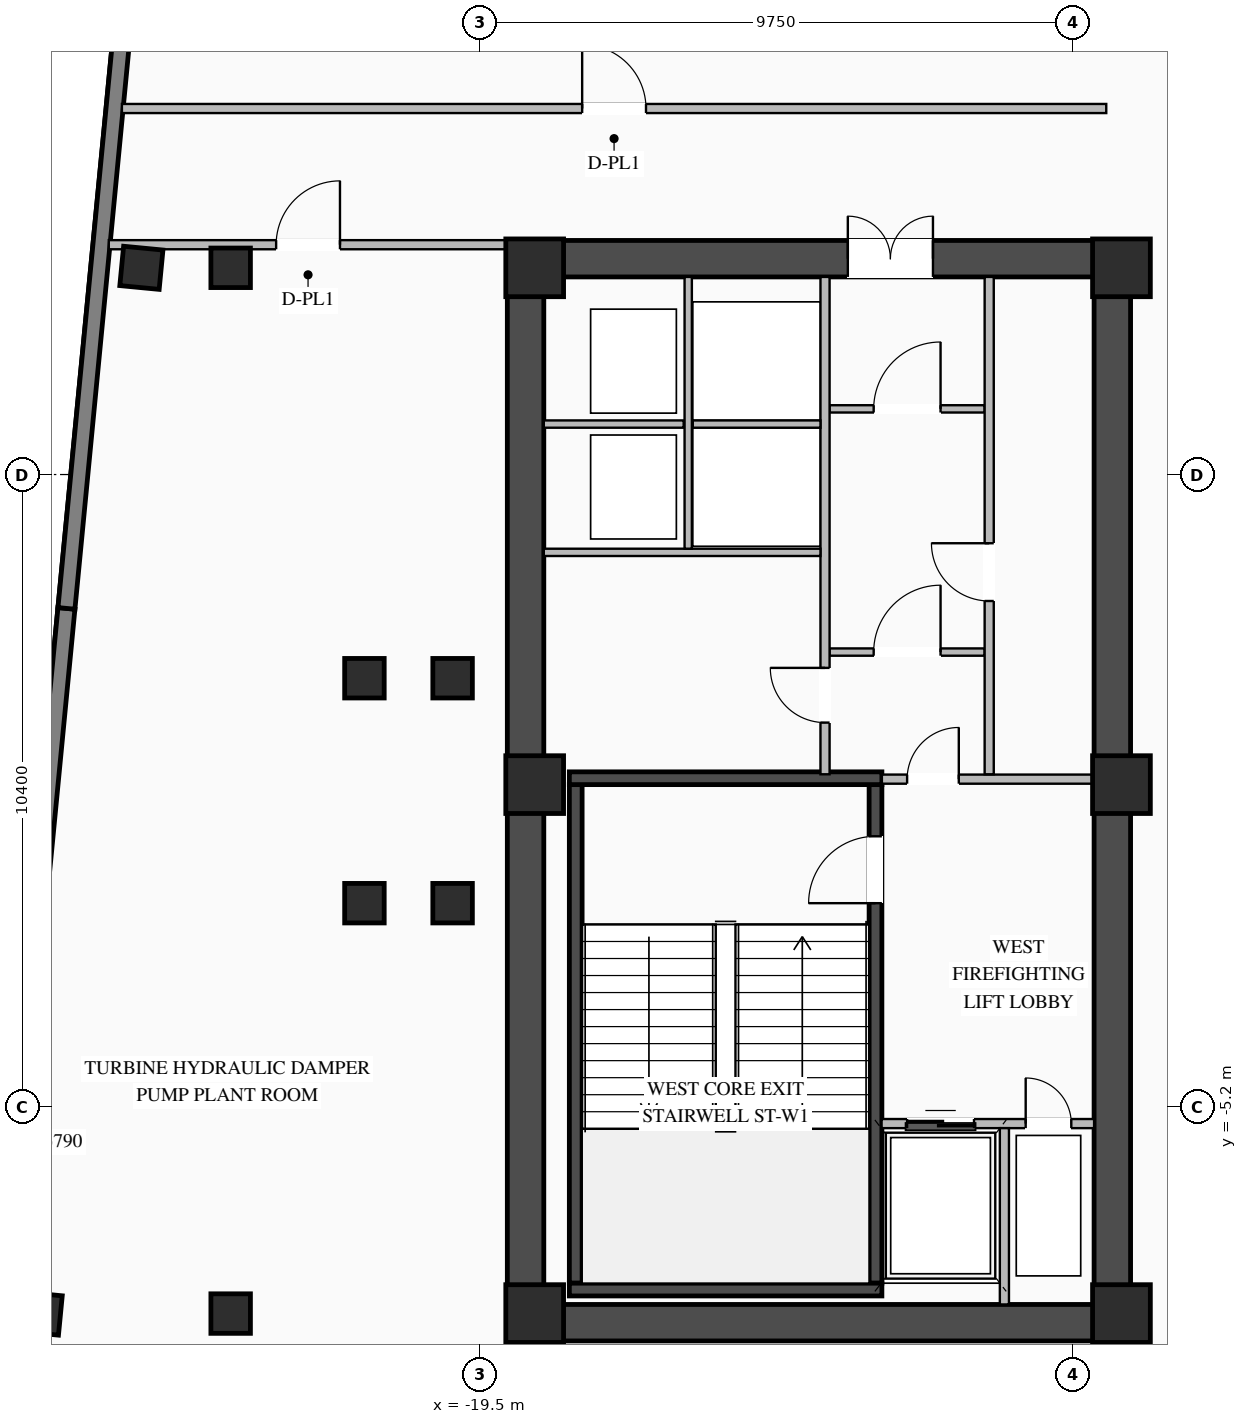
"""IFC4 building model, lengths in metres.
Left out: names, types, materials, properties, quantities, classifications, styles, units other than length and angle.
Written with IfcOpenShell. Run it as: python <this file> out.ifc"""

import sys

from ifc_helpers import new_model, si_unit, direction, frame, frame_2d, origin, origin_2d, place, context, subcontext, project, spatial, rectangle, i_section, extrude, element, fill, save


model = new_model("IFC4")
c1 = context("Model", 3, precision=1e-05, world=origin(), true_north=direction((0.0, 1.0)))
c2 = subcontext(c1, "Body", "Model", "MODEL_VIEW")
j1 = project(units=[si_unit("LENGTHUNIT", "METRE"), si_unit("PLANEANGLEUNIT", "RADIAN")], contexts=[c1])
p1 = place(None, origin())
s1 = spatial("IfcSite", under=j1, at=p1, CompositionType="ELEMENT")
p2 = place(p1, origin())
s2 = spatial("IfcBuilding", under=s1, at=p2, CompositionType="ELEMENT")
p3 = place(p2, frame((0.0, 0.0, 199.5)))
s3 = spatial("IfcBuildingStorey", under=s2, at=p3, CompositionType="ELEMENT", Elevation=199.5)
p4 = place(p3, frame((-19.05, -8.75, 0.0), z_axis=(0.0, 0.0, 1.0), x_axis=(1.0, 0.0, 0.0)))
e1 = element("IfcWall", 1, at=p4, inside=s3, PredefinedType="SHEAR", context=c2, shape_type="SweptSolid", body=[
    extrude(rectangle(XDim=10.25, YDim=0.6, at=frame_2d((5.125, 0.0))), origin(), (0.0, 0.0, 1.0), 4.52),
])
p5 = place(p3, frame((-19.05, 8.75, 0.0), z_axis=(0.0, 0.0, 1.0), x_axis=(1.0, 0.0, 0.0)))
e2 = element("IfcWall", 2, at=p5, inside=s3, PredefinedType="SHEAR", context=c2, shape_type="SweptSolid", body=[
    extrude(rectangle(XDim=10.25, YDim=0.6, at=frame_2d((5.125, 0.0))), origin(), (0.0, 0.0, 1.0), 4.52),
])
p6 = place(p5, frame((5.6, 0.0, 0.0)))
e3 = element("IfcOpeningElement", 3, at=p6, cuts=e2, PredefinedType="OPENING", context=c2, shape_type="SweptSolid", body=[
    extrude(rectangle(XDim=1.4, YDim=2.05, at=frame_2d((0.7, 1.025))), frame((0.0, 0.31, 0.0), z_axis=(0.0, -1.0, 0.0), x_axis=(1.0, 0.0, 0.0)), (0.0, 0.0, 1.0), 0.62),
])
for number, where, z_axis, x_axis in (
    (4, (-18.75, -8.45, 0.0), (0.0, 0.0, 1.0), (0.0, 1.0, 0.0)),
    (5, (-9.1, -8.45, 0.0), (0.0, 0.0, 1.0), (0.0, 1.0, 0.0)),
):
    element("IfcWall", number, at=place(p3, frame(where, z_axis=z_axis, x_axis=x_axis)), inside=s3, PredefinedType="SHEAR", context=c2, shape_type="SweptSolid", body=[
        extrude(rectangle(XDim=16.9, YDim=0.6, at=frame_2d((8.45, 0.0))), origin(), (0.0, 0.0, 1.0), 4.52),
    ])
p7 = place(p3, frame((-12.995, -8.1, 0.0), z_axis=(0.0, 0.0, 1.0), x_axis=(0.0, 1.0, 0.0)))
e6 = element("IfcWall", 6, at=p7, inside=s3, PredefinedType="SHEAR", context=c2, shape_type="SweptSolid", body=[
    extrude(rectangle(XDim=8.2, YDim=0.21, at=frame_2d((4.1, 0.0))), origin(), (0.0, 0.0, 1.0), 4.52),
])
p8 = place(p7, frame((6.25, 0.0, 0.0)))
e7 = element("IfcOpeningElement", 7, at=p8, cuts=e6, PredefinedType="OPENING", context=c2, shape_type="SweptSolid", body=[
    extrude(rectangle(XDim=1.1, YDim=2.15, at=frame_2d((0.55, 1.075))), frame((0.0, 0.115, 0.0), z_axis=(0.0, -1.0, 0.0), x_axis=(1.0, 0.0, 0.0)), (0.0, 0.0, 1.0), 0.23),
])
p9 = place(p3, frame((-17.925, -8.1, 0.0), z_axis=(0.0, 0.0, 1.0), x_axis=(0.0, 1.0, 0.0)))
e8 = element("IfcWall", 8, at=p9, inside=s3, PredefinedType="SHEAR", context=c2, shape_type="SweptSolid", body=[
    extrude(rectangle(XDim=8.2, YDim=0.21, at=frame_2d((4.1, 0.0))), origin(), (0.0, 0.0, 1.0), 4.52),
])
for number, where, z_axis, x_axis in (
    (9, (-18.03, -8.205, 0.0), (0.0, 0.0, 1.0), (1.0, 0.0, 0.0)),
    (10, (-12.89, 0.205, 0.0), (0.0, 0.0, 1.0), (-1.0, 0.0, 0.0)),
):
    element("IfcWall", number, at=place(p3, frame(where, z_axis=z_axis, x_axis=x_axis)), inside=s3, PredefinedType="SHEAR", context=c2, shape_type="SweptSolid", body=[
        extrude(rectangle(XDim=5.14, YDim=0.21, at=frame_2d((2.57, 0.0))), origin(), (0.0, 0.0, 1.0), 4.52),
    ])
for number, where, z_axis, x_axis in (
    (11, (-8.95, -8.6, 0.0), (0.0, 0.0, 1.0), (1.0, 0.0, 0.0)),
    (12, (-8.95, 0.1, 0.0), (0.0, 0.0, 1.0), (1.0, 0.0, 0.0)),
    (13, (-8.95, 8.6, 0.0), (0.0, 0.0, 1.0), (1.0, 0.0, 0.0)),
    (14, (-18.6, -8.6, 0.0), (0.0, 0.0, 1.0), (1.0, 0.0, 0.0)),
    (15, (-18.6, 0.1, 0.0), (0.0, 0.0, 1.0), (1.0, 0.0, 0.0)),
    (16, (-18.6, 8.6, 0.0), (0.0, 0.0, 1.0), (1.0, 0.0, 0.0)),
):
    element("IfcColumn", number, at=place(p3, frame(where, z_axis=z_axis, x_axis=x_axis)), inside=s3, PredefinedType="COLUMN", context=c2, shape_type="SweptSolid", body=[
        extrude(rectangle(XDim=0.95, YDim=0.95, at=origin_2d()), origin(), (0.0, 0.0, 1.0), 4.8),
    ])
for number, where, z_axis, x_axis in (
    (17, (-21.4, -1.85, 0.0), (0.0, 0.0, 1.0), (1.0, 0.0, 0.0)),
    (18, (-21.4, 1.85, 0.0), (0.0, 0.0, 1.0), (1.0, 0.0, 0.0)),
    (19, (-19.95, -1.85, 0.0), (0.0, 0.0, 1.0), (1.0, 0.0, 0.0)),
    (20, (-19.95, 1.85, 0.0), (0.0, 0.0, 1.0), (1.0, 0.0, 0.0)),
    (21, (-23.6, -8.6, 0.0), (0.0, 0.0, 1.0), (1.0, 0.0, 0.0)),
    (22, (-23.6, 8.6, 0.0), (0.0, 0.0, 1.0), (1.0, 0.0, 0.0)),
    (23, (-26.724, -8.6, 0.0), (0.0, 0.0, 1.0), (0.995, -0.096, 0.0)),
    (24, (-25.068, 8.6, 0.0), (0.0, 0.0, 1.0), (0.995, -0.096, 0.0)),
):
    element("IfcColumn", number, at=place(p3, frame(where, z_axis=z_axis, x_axis=x_axis)), inside=s3, PredefinedType="COLUMN", context=c2, shape_type="SweptSolid", body=[
        extrude(i_section(OverallWidth=0.65, OverallDepth=0.65, WebThickness=0.028, FlangeThickness=0.04, at=origin_2d()), origin(), (0.0, 0.0, 1.0), 4.8),
    ])
p10 = place(p3, frame((-27.91, -13.714, 0.0), z_axis=(0.0, 0.0, 1.0), x_axis=(0.095839027265, 0.995396845913, 0.0)))
e25 = element("IfcWall", 25, at=p10, inside=s3, PredefinedType="STANDARD", context=c2, shape_type="SweptSolid", body=[
    extrude(rectangle(XDim=16.79, YDim=0.28, at=frame_2d((8.395, 0.0))), origin(), (0.0, 0.0, 1.0), 4.5),
])
p11 = place(p3, frame((-26.301, 2.998, 0.0), z_axis=(0.0, 0.0, 1.0), x_axis=(0.095837640115, 0.99539697947, 0.0)))
e26 = element("IfcWall", 26, at=p11, inside=s3, PredefinedType="STANDARD", context=c2, shape_type="SweptSolid", body=[
    extrude(rectangle(XDim=16.79, YDim=0.28, at=frame_2d((8.395, 0.0))), origin(), (0.0, 0.0, 1.0), 4.5),
])
p12 = place(p3, frame((-12.895, -5.475, 0.0), z_axis=(0.0, 0.0, 1.0), x_axis=(1.0, 0.0, 0.0)))
e27 = element("IfcWall", 27, at=p12, inside=s3, PredefinedType="STANDARD", context=c2, shape_type="SweptSolid", body=[
    extrude(rectangle(XDim=3.495, YDim=0.15, at=frame_2d((1.748, 0.0))), origin(), (0.0, 0.0, 1.0), 4.5),
])
p13 = place(p12, frame((0.42, 0.0, 0.0)))
e28 = element("IfcOpeningElement", 28, at=p13, cuts=e27, PredefinedType="OPENING", context=c2, shape_type="SweptSolid", body=[
    extrude(rectangle(XDim=1.1, YDim=2.15, at=frame_2d((0.55, 1.075))), frame((0.0, 0.085, 0.0), z_axis=(0.0, -1.0, 0.0), x_axis=(1.0, 0.0, 0.0)), (0.0, 0.0, 1.0), 0.17),
])
p14 = place(p12, frame((2.37, 0.0, 0.0)))
e29 = element("IfcOpeningElement", 29, at=p14, cuts=e27, PredefinedType="OPENING", context=c2, shape_type="SweptSolid", body=[
    extrude(rectangle(XDim=0.75, YDim=2.05, at=frame_2d((0.375, 1.025))), frame((0.0, 0.085, 0.0), z_axis=(0.0, -1.0, 0.0), x_axis=(1.0, 0.0, 0.0)), (0.0, 0.0, 1.0), 0.17),
])
p15 = place(p3, frame((-10.875, -8.45, 0.0), z_axis=(0.0, 0.0, 1.0), x_axis=(0.0, 1.0, 0.0)))
e30 = element("IfcWall", 30, at=p15, inside=s3, PredefinedType="STANDARD", context=c2, shape_type="SweptSolid", body=[
    extrude(rectangle(XDim=2.9, YDim=0.15, at=frame_2d((1.45, 0.0))), origin(), (0.0, 0.0, 1.0), 4.5),
])
p16 = place(p3, frame((-12.89, 0.19, 0.0), z_axis=(0.0, 0.0, 1.0), x_axis=(1.0, 0.0, 0.0)))
e31 = element("IfcWall", 31, at=p16, inside=s3, PredefinedType="STANDARD", context=c2, shape_type="SweptSolid", body=[
    extrude(rectangle(XDim=3.49, YDim=0.15, at=frame_2d((1.745, 0.0))), origin(), (0.0, 0.0, 1.0), 3.895),
])
p17 = place(p16, frame((0.415, 0.0, 0.0)))
e32 = element("IfcOpeningElement", 32, at=p17, cuts=e31, PredefinedType="OPENING", context=c2, shape_type="SweptSolid", body=[
    extrude(rectangle(XDim=0.85, YDim=2.04, at=frame_2d((0.425, 1.02))), frame((0.0, 0.085, 0.0), z_axis=(0.0, -1.0, 0.0), x_axis=(1.0, 0.0, 0.0)), (0.0, 0.0, 1.0), 0.17),
])
p18 = place(p3, frame((-13.75, 2.28, 0.0), z_axis=(0.0, 0.0, 1.0), x_axis=(1.0, 0.0, 0.0)))
e33 = element("IfcWall", 33, at=p18, inside=s3, PredefinedType="STANDARD", context=c2, shape_type="SweptSolid", body=[
    extrude(rectangle(XDim=2.55, YDim=0.12, at=frame_2d((1.275, 0.0))), origin(), (0.0, 0.0, 1.0), 4.5),
])
p19 = place(p18, frame((0.725, 0.0, 0.0)))
e34 = element("IfcOpeningElement", 34, at=p19, cuts=e33, PredefinedType="OPENING", context=c2, shape_type="SweptSolid", body=[
    extrude(rectangle(XDim=1.1, YDim=2.1, at=frame_2d((0.55, 1.05))), frame((0.0, 0.07, 0.0), z_axis=(0.0, -1.0, 0.0), x_axis=(1.0, 0.0, 0.0)), (0.0, 0.0, 1.0), 0.14),
])
p20 = place(p3, frame((-13.75, 6.28, 0.0), z_axis=(0.0, 0.0, 1.0), x_axis=(1.0, 0.0, 0.0)))
e35 = element("IfcWall", 35, at=p20, inside=s3, PredefinedType="STANDARD", context=c2, shape_type="SweptSolid", body=[
    extrude(rectangle(XDim=2.55, YDim=0.12, at=frame_2d((1.275, 0.0))), origin(), (0.0, 0.0, 1.0), 4.5),
])
p21 = place(p20, frame((0.725, 0.0, 0.0)))
e36 = element("IfcOpeningElement", 36, at=p21, cuts=e35, PredefinedType="OPENING", context=c2, shape_type="SweptSolid", body=[
    extrude(rectangle(XDim=1.1, YDim=2.1, at=frame_2d((0.55, 1.05))), frame((0.0, 0.07, 0.0), z_axis=(0.0, -1.0, 0.0), x_axis=(1.0, 0.0, 0.0)), (0.0, 0.0, 1.0), 0.14),
])
p22 = place(p3, frame((-11.125, 0.27, 0.0), z_axis=(0.0, 0.0, 1.0), x_axis=(0.0, 1.0, 0.0)))
e37 = element("IfcWall", 37, at=p22, inside=s3, PredefinedType="STANDARD", context=c2, shape_type="SweptSolid", body=[
    extrude(rectangle(XDim=8.18, YDim=0.15, at=frame_2d((4.09, 0.0))), origin(), (0.0, 0.0, 1.0), 4.5),
])
p23 = place(p22, frame((2.85, 0.0, 0.0)))
e38 = element("IfcOpeningElement", 38, at=p23, cuts=e37, PredefinedType="OPENING", context=c2, shape_type="SweptSolid", body=[
    extrude(rectangle(XDim=0.95, YDim=2.05, at=frame_2d((0.475, 1.025))), frame((0.0, 0.085, 0.0), z_axis=(0.0, -1.0, 0.0), x_axis=(1.0, 0.0, 0.0)), (0.0, 0.0, 1.0), 0.17),
])
p24 = place(p3, frame((-13.825, 0.27, 0.0), z_axis=(0.0, 0.0, 1.0), x_axis=(0.0, 1.0, 0.0)))
e39 = element("IfcWall", 39, at=p24, inside=s3, PredefinedType="STANDARD", context=c2, shape_type="SweptSolid", body=[
    extrude(rectangle(XDim=8.18, YDim=0.15, at=frame_2d((4.09, 0.0))), origin(), (0.0, 0.0, 1.0), 4.5),
])
p25 = place(p24, frame((0.85, 0.0, 0.0)))
e40 = element("IfcOpeningElement", 40, at=p25, cuts=e39, PredefinedType="OPENING", context=c2, shape_type="SweptSolid", body=[
    extrude(rectangle(XDim=0.9, YDim=2.05, at=frame_2d((0.45, 1.025))), frame((0.0, 0.085, 0.0), z_axis=(0.0, -1.0, 0.0), x_axis=(1.0, 0.0, 0.0)), (0.0, 0.0, 1.0), 0.17),
])
p26 = place(p3, frame((-18.45, 3.92, 0.0), z_axis=(0.0, 0.0, 1.0), x_axis=(1.0, 0.0, 0.0)))
e41 = element("IfcWall", 41, at=p26, inside=s3, PredefinedType="STANDARD", context=c2, shape_type="SweptSolid", body=[
    extrude(rectangle(XDim=4.55, YDim=0.12, at=frame_2d((2.275, 0.0))), origin(), (0.0, 0.0, 1.0), 4.5),
])
p27 = place(p3, frame((-18.45, 6.03, 0.0), z_axis=(0.0, 0.0, 1.0), x_axis=(1.0, 0.0, 0.0)))
e42 = element("IfcWall", 42, at=p27, inside=s3, PredefinedType="STANDARD", context=c2, shape_type="SweptSolid", body=[
    extrude(rectangle(XDim=2.3, YDim=0.12, at=frame_2d((1.15, 0.0))), origin(), (0.0, 0.0, 1.0), 4.5),
])
p28 = place(p3, frame((-16.075, 3.98, 0.0), z_axis=(0.0, 0.0, 1.0), x_axis=(0.0, 1.0, 0.0)))
e43 = element("IfcWall", 43, at=p28, inside=s3, PredefinedType="STANDARD", context=c2, shape_type="SweptSolid", body=[
    extrude(rectangle(XDim=4.47, YDim=0.12, at=frame_2d((2.235, 0.0))), origin(), (0.0, 0.0, 1.0), 4.5),
])
p29 = place(p3, frame((-16.0, 6.03, 0.0), z_axis=(0.0, 0.0, 1.0), x_axis=(1.0, 0.0, 0.0)))
e44 = element("IfcWall", 44, at=p29, inside=s3, PredefinedType="STANDARD", context=c2, shape_type="SweptSolid", body=[
    extrude(rectangle(XDim=2.1, YDim=0.12, at=frame_2d((1.05, 0.0))), origin(), (0.0, 0.0, 1.0), 4.5),
])
p30 = place(p3, frame((-25.389, 11.22, 0.0), z_axis=(0.0, 0.0, 1.0), x_axis=(1.0, 0.0, 0.0)))
e45 = element("IfcWall", 45, at=p30, inside=s3, PredefinedType="STANDARD", context=c2, shape_type="SweptSolid", body=[
    extrude(rectangle(XDim=16.189, YDim=0.15, at=frame_2d((8.094, 0.0))), origin(), (0.0, 0.0, 1.0), 4.5),
])
p31 = place(p30, frame((7.569, 0.0, 0.0)))
e46 = element("IfcOpeningElement", 46, at=p31, cuts=e45, PredefinedType="OPENING", context=c2, shape_type="SweptSolid", body=[
    extrude(rectangle(XDim=1.05, YDim=2.08, at=frame_2d((0.525, 1.04))), frame((0.0, 0.085, 0.0), z_axis=(0.0, -1.0, 0.0), x_axis=(1.0, 0.0, 0.0)), (0.0, 0.0, 1.0), 0.17),
])
p32 = place(p3, frame((-25.604, 8.98, 0.0), z_axis=(0.0, 0.0, 1.0), x_axis=(1.0, 0.0, 0.0)))
e47 = element("IfcWall", 47, at=p32, inside=s3, PredefinedType="STANDARD", context=c2, shape_type="SweptSolid", body=[
    extrude(rectangle(XDim=6.554, YDim=0.15, at=frame_2d((3.277, 0.0))), origin(), (0.0, 0.0, 1.0), 4.5),
])
p33 = place(p32, frame((2.752, 0.0, 0.0)))
e48 = element("IfcOpeningElement", 48, at=p33, cuts=e47, PredefinedType="OPENING", context=c2, shape_type="SweptSolid", body=[
    extrude(rectangle(XDim=1.05, YDim=2.08, at=frame_2d((0.525, 1.04))), frame((0.0, 0.085, 0.0), z_axis=(0.0, -1.0, 0.0), x_axis=(1.0, 0.0, 0.0)), (0.0, 0.0, 1.0), 0.17),
])
p34 = place(p8, origin())
e49 = element("IfcDoor", 49, at=p34, inside=s3, OperationType="SINGLE_SWING_LEFT", PredefinedType="DOOR", context=c2, shape_type="SweptSolid", body=[
    extrude(rectangle(XDim=1.1, YDim=2.15, at=frame_2d((0.55, 1.075))), frame((0.0, 0.025, 0.0), z_axis=(0.0, -1.0, 0.0), x_axis=(1.0, 0.0, 0.0)), (0.0, 0.0, 1.0), 0.05),
])
fill(e7, e49)
p35 = place(p13, origin())
e50 = element("IfcDoor", 50, at=p35, inside=s3, OperationType="DOUBLE_DOOR_SLIDING", PredefinedType="DOOR", context=c2, shape_type="SweptSolid", body=[
    extrude(rectangle(XDim=1.1, YDim=2.15, at=frame_2d((0.55, 1.075))), frame((0.0, 0.025, 0.0), z_axis=(0.0, -1.0, 0.0), x_axis=(1.0, 0.0, 0.0)), (0.0, 0.0, 1.0), 0.05),
])
fill(e28, e50)
p36 = place(p14, origin())
e51 = element("IfcDoor", 51, at=p36, inside=s3, OperationType="SINGLE_SWING_LEFT", PredefinedType="DOOR", context=c2, shape_type="SweptSolid", body=[
    extrude(rectangle(XDim=0.75, YDim=2.05, at=frame_2d((0.375, 1.025))), frame((0.0, 0.025, 0.0), z_axis=(0.0, -1.0, 0.0), x_axis=(1.0, 0.0, 0.0)), (0.0, 0.0, 1.0), 0.05),
])
fill(e29, e51)
p37 = place(p17, origin())
e52 = element("IfcDoor", 52, at=p37, inside=s3, OperationType="SINGLE_SWING_RIGHT", PredefinedType="DOOR", context=c2, shape_type="SweptSolid", body=[
    extrude(rectangle(XDim=0.85, YDim=2.04, at=frame_2d((0.425, 1.02))), frame((0.0, 0.025, 0.0), z_axis=(0.0, -1.0, 0.0), x_axis=(1.0, 0.0, 0.0)), (0.0, 0.0, 1.0), 0.05),
])
fill(e32, e52)
p38 = place(p19, origin())
e53 = element("IfcDoor", 53, at=p38, inside=s3, OperationType="SINGLE_SWING_RIGHT", PredefinedType="DOOR", context=c2, shape_type="SweptSolid", body=[
    extrude(rectangle(XDim=1.1, YDim=2.1, at=frame_2d((0.55, 1.05))), frame((0.0, 0.025, 0.0), z_axis=(0.0, -1.0, 0.0), x_axis=(1.0, 0.0, 0.0)), (0.0, 0.0, 1.0), 0.05),
])
fill(e34, e53)
p39 = place(p21, origin())
e54 = element("IfcDoor", 54, at=p39, inside=s3, OperationType="SINGLE_SWING_RIGHT", PredefinedType="DOOR", context=c2, shape_type="SweptSolid", body=[
    extrude(rectangle(XDim=1.1, YDim=2.1, at=frame_2d((0.55, 1.05))), frame((0.0, 0.025, 0.0), z_axis=(0.0, -1.0, 0.0), x_axis=(1.0, 0.0, 0.0)), (0.0, 0.0, 1.0), 0.05),
])
fill(e36, e54)
p40 = place(p6, origin())
e55 = element("IfcDoor", 55, at=p40, inside=s3, OperationType="DOUBLE_DOOR_SINGLE_SWING", PredefinedType="DOOR", context=c2, shape_type="SweptSolid", body=[
    extrude(rectangle(XDim=1.4, YDim=2.05, at=frame_2d((0.7, 1.025))), frame((0.0, 0.245, 0.0), z_axis=(0.0, -1.0, 0.0), x_axis=(1.0, 0.0, 0.0)), (0.0, 0.0, 1.0), 0.05),
])
fill(e3, e55)
p41 = place(p23, origin())
e56 = element("IfcDoor", 56, at=p41, inside=s3, OperationType="SINGLE_SWING_RIGHT", PredefinedType="DOOR", context=c2, shape_type="SweptSolid", body=[
    extrude(rectangle(XDim=0.95, YDim=2.05, at=frame_2d((0.475, 1.025))), frame((0.0, 0.025, 0.0), z_axis=(0.0, -1.0, 0.0), x_axis=(1.0, 0.0, 0.0)), (0.0, 0.0, 1.0), 0.05),
])
fill(e38, e56)
p42 = place(p25, origin())
e57 = element("IfcDoor", 57, at=p42, inside=s3, OperationType="SINGLE_SWING_RIGHT", PredefinedType="DOOR", context=c2, shape_type="SweptSolid", body=[
    extrude(rectangle(XDim=0.9, YDim=2.05, at=frame_2d((0.45, 1.025))), frame((0.0, 0.025, 0.0), z_axis=(0.0, -1.0, 0.0), x_axis=(1.0, 0.0, 0.0)), (0.0, 0.0, 1.0), 0.05),
])
fill(e40, e57)
p43 = place(p31, origin())
e58 = element("IfcDoor", 58, at=p43, inside=s3, OperationType="SINGLE_SWING_LEFT", PredefinedType="DOOR", context=c2, shape_type="SweptSolid", body=[
    extrude(rectangle(XDim=1.05, YDim=2.08, at=frame_2d((0.525, 1.04))), frame((0.0, 0.025, 0.0), z_axis=(0.0, -1.0, 0.0), x_axis=(1.0, 0.0, 0.0)), (0.0, 0.0, 1.0), 0.05),
])
fill(e46, e58)
p44 = place(p33, origin())
e59 = element("IfcDoor", 59, at=p44, inside=s3, OperationType="SINGLE_SWING_RIGHT", PredefinedType="DOOR", context=c2, shape_type="SweptSolid", body=[
    extrude(rectangle(XDim=1.05, YDim=2.08, at=frame_2d((0.525, 1.04))), frame((0.0, 0.025, 0.0), z_axis=(0.0, -1.0, 0.0), x_axis=(1.0, 0.0, 0.0)), (0.0, 0.0, 1.0), 0.05),
])
fill(e48, e59)
save(model, sys.argv[1])
